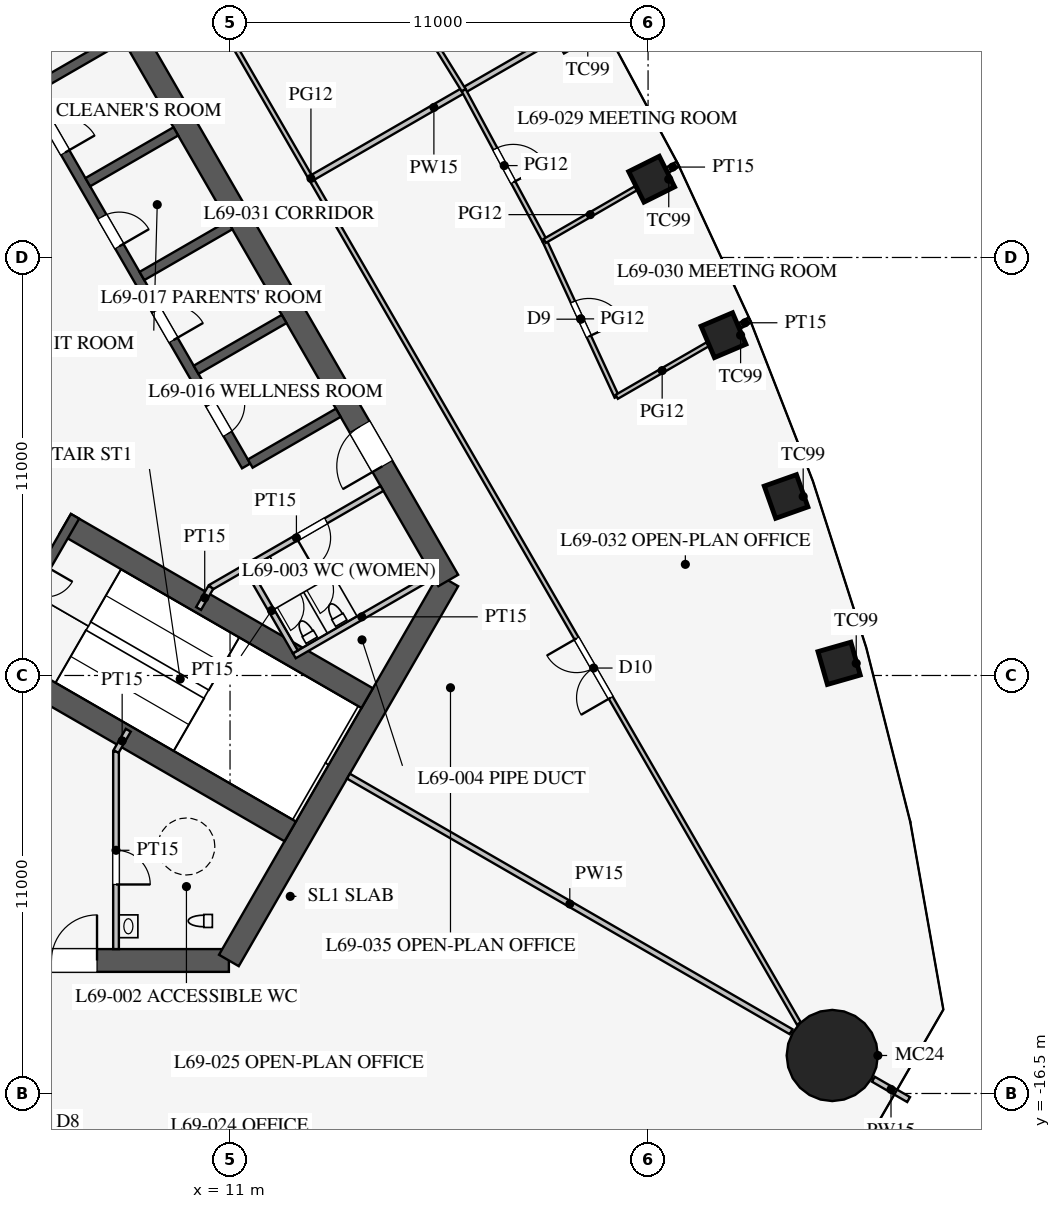
"""IFC4 building model, lengths in metres.
Left out: names, types, materials, properties, quantities, classifications, styles, units other than length and angle.
Written with IfcOpenShell. Run it as: python <this file> out.ifc"""

import sys

from ifc_helpers import new_model, si_unit, direction, frame, frame_2d, origin, origin_2d, place, context, subcontext, project, spatial, rectangle, circle, extrude, element, fill, save


model = new_model("IFC4")
c1 = context("Model", 3, precision=1e-05, world=origin(), true_north=direction((0.0, 1.0)))
c2 = subcontext(c1, "Body", "Model", "MODEL_VIEW")
j1 = project(units=[si_unit("LENGTHUNIT", "METRE"), si_unit("PLANEANGLEUNIT", "RADIAN")], contexts=[c1])
p1 = place(None, origin())
s1 = spatial("IfcSite", under=j1, at=p1, CompositionType="ELEMENT")
p2 = place(p1, origin())
s2 = spatial("IfcBuilding", under=s1, at=p2, CompositionType="ELEMENT")
p3 = place(p2, frame((0.0, 0.0, 301.5)))
s3 = spatial("IfcBuildingStorey", under=s2, at=p3, CompositionType="ELEMENT", Elevation=301.5)
for number, where, z_axis, x_axis in (
    (1, (27.027, -5.18, 0.0), (0.0, 0.0, 1.0), (-0.275, 0.961, 0.0)),
    (2, (25.632, -0.79, 0.0), (0.0, 0.0, 1.0), (-0.334, 0.942, 0.0)),
    (3, (23.985, 3.455, 0.0), (0.0, 0.0, 1.0), (-0.391, 0.92, 0.0)),
    (4, (22.094, 7.56, 0.0), (0.0, 0.0, 1.0), (-0.447, 0.895, 0.0)),
):
    element("IfcColumn", number, at=place(p3, frame(where, z_axis=z_axis, x_axis=x_axis)), inside=s3, PredefinedType="COLUMN", context=c2, shape_type="SweptSolid", body=[
        extrude(rectangle(XDim=0.9, YDim=0.9, at=origin_2d()), origin(), (0.0, 0.0, 1.0), 4.2),
    ])
p4 = place(p3, frame((26.847, -15.5, 0.0), z_axis=(0.0, 0.0, 1.0), x_axis=(1.0, 0.0, 0.0)))
e5 = element("IfcColumn", 5, at=p4, inside=s3, PredefinedType="COLUMN", context=c2, shape_type="SweptSolid", body=[
    extrude(circle(Radius=1.2, at=origin_2d()), origin(), (0.0, 0.0, 1.0), 4.2),
])
p5 = place(p3, frame((-10.97, -13.0, 0.0), z_axis=(0.0, 0.0, 1.0), x_axis=(1.0, 0.0, 0.0)))
e6 = element("IfcWall", 6, at=p5, inside=s3, PredefinedType="SHEAR", context=c2, shape_type="SweptSolid", body=[
    extrude(rectangle(XDim=21.939, YDim=0.6, at=frame_2d((10.97, 0.0))), origin(), (0.0, 0.0, 1.0), 4.2),
])
p6 = place(p5, frame((17.27, 0.0, 0.0)))
e7 = element("IfcOpeningElement", 7, at=p6, cuts=e6, PredefinedType="OPENING", context=c2, shape_type="SweptSolid", body=[
    extrude(rectangle(XDim=1.2, YDim=2.1, at=frame_2d((0.6, 1.05))), frame((0.0, 0.31, 0.0), z_axis=(0.0, -1.0, 0.0), x_axis=(1.0, 0.0, 0.0)), (0.0, 0.0, 1.0), 0.62),
])
p7 = place(p5, frame((3.47, 0.0, 0.0)))
e8 = element("IfcOpeningElement", 8, at=p7, cuts=e6, PredefinedType="OPENING", context=c2, shape_type="SweptSolid", body=[
    extrude(rectangle(XDim=1.2, YDim=2.1, at=frame_2d((0.6, 1.05))), frame((0.0, 0.31, 0.0), z_axis=(0.0, -1.0, 0.0), x_axis=(1.0, 0.0, 0.0)), (0.0, 0.0, 1.0), 0.62),
])
p8 = place(p3, frame((10.97, -13.0, 0.0), z_axis=(0.0, 0.0, 1.0), x_axis=(0.499995765644, 0.866027848477, 0.0)))
e9 = element("IfcWall", 9, at=p8, inside=s3, PredefinedType="SHEAR", context=c2, shape_type="SweptSolid", body=[
    extrude(rectangle(XDim=11.547, YDim=0.6, at=frame_2d((5.773, 0.0))), origin(), (0.0, 0.0, 1.0), 4.2),
])
p9 = place(p3, frame((16.743, -3.0, 0.0), z_axis=(0.0, 0.0, 1.0), x_axis=(-0.500002442456, 0.866023993627, 0.0)))
e10 = element("IfcWall", 10, at=p9, inside=s3, PredefinedType="SHEAR", context=c2, shape_type="SweptSolid", body=[
    extrude(rectangle(XDim=21.939, YDim=0.6, at=frame_2d((10.97, 0.0))), origin(), (0.0, 0.0, 1.0), 4.2),
])
p10 = place(p9, frame((17.27, 0.0, 0.0)))
e11 = element("IfcOpeningElement", 11, at=p10, cuts=e10, PredefinedType="OPENING", context=c2, shape_type="SweptSolid", body=[
    extrude(rectangle(XDim=1.2, YDim=2.1, at=frame_2d((0.6, 1.05))), frame((0.0, 0.31, 0.0), z_axis=(0.0, -1.0, 0.0), x_axis=(1.0, 0.0, 0.0)), (0.0, 0.0, 1.0), 0.62),
])
p11 = place(p9, frame((3.47, 0.0, 0.0)))
e12 = element("IfcOpeningElement", 12, at=p11, cuts=e10, PredefinedType="OPENING", context=c2, shape_type="SweptSolid", body=[
    extrude(rectangle(XDim=1.2, YDim=2.1, at=frame_2d((0.6, 1.05))), frame((0.0, 0.31, 0.0), z_axis=(0.0, -1.0, 0.0), x_axis=(1.0, 0.0, 0.0)), (0.0, 0.0, 1.0), 0.62),
])
p12 = place(p3, frame((11.424, 0.014, 0.0), z_axis=(0.0, 0.0, 1.0), x_axis=(-0.500001763848, 0.866024385424, 0.0)))
e13 = element("IfcWall", 13, at=p12, inside=s3, PredefinedType="SHEAR", context=c2, shape_type="SweptSolid", body=[
    extrude(rectangle(XDim=11.4, YDim=0.25, at=frame_2d((5.7, 0.0))), origin(), (0.0, 0.0, 1.0), 4.2),
])
p13 = place(p12, frame((0.975, 0.0, 0.0)))
e14 = element("IfcOpeningElement", 14, at=p13, cuts=e13, PredefinedType="OPENING", context=c2, shape_type="SweptSolid", body=[
    extrude(rectangle(XDim=0.9, YDim=2.1, at=frame_2d((0.45, 1.05))), frame((0.0, 0.135, 0.0), z_axis=(0.0, -1.0, 0.0), x_axis=(1.0, 0.0, 0.0)), (0.0, 0.0, 1.0), 0.27),
])
p14 = place(p12, frame((3.825, 0.0, 0.0)))
e15 = element("IfcOpeningElement", 15, at=p14, cuts=e13, PredefinedType="OPENING", context=c2, shape_type="SweptSolid", body=[
    extrude(rectangle(XDim=0.9, YDim=2.1, at=frame_2d((0.45, 1.05))), frame((0.0, 0.135, 0.0), z_axis=(0.0, -1.0, 0.0), x_axis=(1.0, 0.0, 0.0)), (0.0, 0.0, 1.0), 0.27),
])
p15 = place(p12, frame((6.675, 0.0, 0.0)))
e16 = element("IfcOpeningElement", 16, at=p15, cuts=e13, PredefinedType="OPENING", context=c2, shape_type="SweptSolid", body=[
    extrude(rectangle(XDim=0.9, YDim=2.1, at=frame_2d((0.45, 1.05))), frame((0.0, 0.135, 0.0), z_axis=(0.0, -1.0, 0.0), x_axis=(1.0, 0.0, 0.0)), (0.0, 0.0, 1.0), 0.27),
])
p16 = place(p12, frame((9.525, 0.0, 0.0)))
e17 = element("IfcOpeningElement", 17, at=p16, cuts=e13, PredefinedType="OPENING", context=c2, shape_type="SweptSolid", body=[
    extrude(rectangle(XDim=0.9, YDim=2.1, at=frame_2d((0.45, 1.05))), frame((0.0, 0.135, 0.0), z_axis=(0.0, -1.0, 0.0), x_axis=(1.0, 0.0, 0.0)), (0.0, 0.0, 1.0), 0.27),
])
for number, where, z_axis, x_axis in (
    (18, (11.532, 0.076, 0.0), (0.0, 0.0, 1.0), (0.866, 0.5, 0.0)),
    (19, (10.107, 2.544, 0.0), (0.0, 0.0, 1.0), (0.866, 0.5, 0.0)),
    (20, (8.682, 5.012, 0.0), (0.0, 0.0, 1.0), (0.866, 0.5, 0.0)),
    (21, (7.257, 7.481, 0.0), (0.0, 0.0, 1.0), (0.866, 0.5, 0.0)),
    (22, (5.832, 9.949, 0.0), (0.0, 0.0, 1.0), (0.866, 0.5, 0.0)),
):
    element("IfcWall", number, at=place(p3, frame(where, z_axis=z_axis, x_axis=x_axis)), inside=s3, PredefinedType="SHEAR", context=c2, shape_type="SweptSolid", body=[
        extrude(rectangle(XDim=2.675, YDim=0.25, at=frame_2d((1.337, 0.0))), origin(), (0.0, 0.0, 1.0), 4.2),
    ])
p17 = place(p3, frame((4.638, -5.016, 0.0), z_axis=(0.0, 0.0, 1.0), x_axis=(0.866012320003, -0.50002266109, 0.0)))
e23 = element("IfcWall", 23, at=p17, inside=s3, PredefinedType="SHEAR", context=c2, shape_type="SweptSolid", body=[
    extrude(rectangle(XDim=9.175, YDim=0.6, at=frame_2d((4.587, 0.0))), origin(), (0.0, 0.0, 1.0), 4.2),
])
p18 = place(p3, frame((6.663, -1.509, 0.0), z_axis=(0.0, 0.0, 1.0), x_axis=(0.86603049496, -0.499991181721, 0.0)))
e24 = element("IfcWall", 24, at=p18, inside=s3, PredefinedType="SHEAR", context=c2, shape_type="SweptSolid", body=[
    extrude(rectangle(XDim=9.175, YDim=0.6, at=frame_2d((4.587, 0.0))), origin(), (0.0, 0.0, 1.0), 4.2),
])
p19 = place(p3, frame((4.597, -5.339, 0.0), z_axis=(0.0, 0.0, 1.0), x_axis=(0.499984536904, 0.866034331223, 0.0)))
e25 = element("IfcWall", 25, at=p19, inside=s3, PredefinedType="SHEAR", context=c2, shape_type="SweptSolid", body=[
    extrude(rectangle(XDim=4.65, YDim=0.25, at=frame_2d((2.325, 0.0))), origin(), (0.0, 0.0, 1.0), 4.2),
])
p20 = place(p19, frame((1.525, 0.0, 0.0)))
e26 = element("IfcOpeningElement", 26, at=p20, cuts=e25, PredefinedType="OPENING", context=c2, shape_type="SweptSolid", body=[
    extrude(rectangle(XDim=1.6, YDim=2.1, at=frame_2d((0.8, 1.05))), frame((0.0, 0.135, 0.0), z_axis=(0.0, -1.0, 0.0), x_axis=(1.0, 0.0, 0.0)), (0.0, 0.0, 1.0), 0.27),
])
p21 = place(p3, frame((8.0, -7.5, 0.0), z_axis=(0.0, 0.0, 1.0), x_axis=(0.0, -1.0, 0.0)))
e27 = element("IfcWall", 27, at=p21, inside=s3, PredefinedType="PARTITIONING", context=c2, shape_type="SweptSolid", body=[
    extrude(rectangle(XDim=5.2, YDim=0.15, at=frame_2d((2.6, 0.0))), origin(), (0.0, 0.0, 1.0), 4.0),
])
p22 = place(p21, frame((2.6, 0.0, 0.0)))
e28 = element("IfcOpeningElement", 28, at=p22, cuts=e27, PredefinedType="OPENING", context=c2, shape_type="SweptSolid", body=[
    extrude(rectangle(XDim=0.9, YDim=2.1, at=frame_2d((0.45, 1.05))), frame((0.0, 0.085, 0.0), z_axis=(0.0, -1.0, 0.0), x_axis=(1.0, 0.0, 0.0)), (0.0, 0.0, 1.0), 0.17),
])
p23 = place(p3, frame((2.495, 10.678, 0.0), z_axis=(0.0, 0.0, 1.0), x_axis=(0.866021400173, 0.500006934395, 0.0)))
e29 = element("IfcWall", 29, at=p23, inside=s3, PredefinedType="PARTITIONING", context=c2, shape_type="SweptSolid", body=[
    extrude(rectangle(XDim=5.2, YDim=0.15, at=frame_2d((2.6, 0.0))), origin(), (0.0, 0.0, 1.0), 4.0),
])
p24 = place(p23, frame((1.3, 0.0, 0.0)))
e30 = element("IfcOpeningElement", 30, at=p24, cuts=e29, PredefinedType="OPENING", context=c2, shape_type="SweptSolid", body=[
    extrude(rectangle(XDim=0.9, YDim=2.1, at=frame_2d((0.45, 1.05))), frame((0.0, 0.085, 0.0), z_axis=(0.0, -1.0, 0.0), x_axis=(1.0, 0.0, 0.0)), (0.0, 0.0, 1.0), 0.17),
])
p25 = place(p3, frame((10.495, -3.178, 0.0), z_axis=(0.0, 0.0, 1.0), x_axis=(0.866021400173, 0.500006934395, 0.0)))
e31 = element("IfcWall", 31, at=p25, inside=s3, PredefinedType="PARTITIONING", context=c2, shape_type="SweptSolid", body=[
    extrude(rectangle(XDim=5.2, YDim=0.15, at=frame_2d((2.6, 0.0))), origin(), (0.0, 0.0, 1.0), 4.0),
])
p26 = place(p25, frame((2.6, 0.0, 0.0)))
e32 = element("IfcOpeningElement", 32, at=p26, cuts=e31, PredefinedType="OPENING", context=c2, shape_type="SweptSolid", body=[
    extrude(rectangle(XDim=0.9, YDim=2.1, at=frame_2d((0.45, 1.05))), frame((0.0, 0.085, 0.0), z_axis=(0.0, -1.0, 0.0), x_axis=(1.0, 0.0, 0.0)), (0.0, 0.0, 1.0), 0.17),
])
for number, where, z_axis, x_axis in (
    (33, (8.0, -7.5, 0.0), (0.0, 0.0, 1.0), (0.5, 0.866, 0.0)),
    (34, (10.495, -3.178, 0.0), (0.0, 0.0, 1.0), (-0.5, -0.866, 0.0)),
):
    element("IfcWall", number, at=place(p3, frame(where, z_axis=z_axis, x_axis=x_axis)), inside=s3, PredefinedType="PARTITIONING", context=c2, shape_type="SweptSolid", body=[
        extrude(rectangle(XDim=0.645, YDim=0.15, at=frame_2d((0.323, 0.0))), origin(), (0.0, 0.0, 1.0), 4.0),
    ])
p27 = place(p3, frame((12.691, -4.982, 0.0), z_axis=(0.0, 0.0, 1.0), x_axis=(0.8660249478, 0.500000789788, 0.0)))
e35 = element("IfcWall", 35, at=p27, inside=s3, PredefinedType="PARTITIONING", context=c2, shape_type="SweptSolid", body=[
    extrude(rectangle(XDim=4.1, YDim=0.15, at=frame_2d((2.05, 0.0))), origin(), (0.0, 0.0, 1.0), 4.0),
])
p28 = place(p3, frame((11.464, -2.706, 0.0), z_axis=(0.0, 0.0, 1.0), x_axis=(0.50001992892, -0.866013897511, 0.0)))
e36 = element("IfcWall", 36, at=p28, inside=s3, PredefinedType="PARTITIONING", context=c2, shape_type="SweptSolid", body=[
    extrude(rectangle(XDim=2.51, YDim=0.15, at=frame_2d((1.255, 0.0))), origin(), (0.0, 0.0, 1.0), 4.0),
])
p29 = place(p3, frame((14.116, -8.15, 0.0), z_axis=(0.0, 0.0, 1.0), x_axis=(0.866020541135, -0.500008422262, 0.0)))
e37 = element("IfcWall", 37, at=p29, inside=s3, PredefinedType="PARTITIONING", context=c2, shape_type="SweptSolid", body=[
    extrude(rectangle(XDim=13.45, YDim=0.15, at=frame_2d((6.725, 0.0))), origin(), (0.0, 0.0, 1.0), 2.5),
])
p30 = place(p3, frame((27.929, -16.125, 0.0), z_axis=(0.0, 0.0, 1.0), x_axis=(0.866086810508, -0.499893625349, 0.0)))
e38 = element("IfcWall", 38, at=p30, inside=s3, PredefinedType="PARTITIONING", context=c2, shape_type="SweptSolid", body=[
    extrude(rectangle(XDim=1.07, YDim=0.15, at=frame_2d((0.535, 0.0))), origin(), (0.0, 0.0, 1.0), 2.5),
])
p31 = place(p3, frame((13.181, 7.61, 0.0), z_axis=(0.0, 0.0, 1.0), x_axis=(0.866027421574, 0.49999650507, 0.0)))
e39 = element("IfcWall", 39, at=p31, inside=s3, PredefinedType="PARTITIONING", context=c2, shape_type="SweptSolid", body=[
    extrude(rectangle(XDim=7.352, YDim=0.15, at=frame_2d((3.676, 0.0))), origin(), (0.0, 0.0, 1.0), 3.3),
])
p32 = place(p3, frame((25.968, -14.657, 0.0), z_axis=(0.0, 0.0, 1.0), x_axis=(-0.500000361757, 0.866025194924, 0.0)))
e40 = element("IfcWall", 40, at=p32, inside=s3, PredefinedType="PARTITIONING", context=c2, shape_type="SweptSolid", body=[
    extrude(rectangle(XDim=51.355, YDim=0.12, at=frame_2d((25.678, 0.0))), origin(), (0.0, 0.0, 1.0), 2.9),
])
p33 = place(p32, frame((9.9, 0.0, 0.15)))
e41 = element("IfcOpeningElement", 41, at=p33, cuts=e40, PredefinedType="OPENING", context=c2, shape_type="SweptSolid", body=[
    extrude(rectangle(XDim=1.8, YDim=2.1, at=frame_2d((0.9, 1.05))), frame((0.0, 0.07, 0.0), z_axis=(0.0, -1.0, 0.0), x_axis=(1.0, 0.0, 0.0)), (0.0, 0.0, 1.0), 0.14),
])
p34 = place(p32, frame((39.65, 0.0, 0.15)))
e42 = element("IfcOpeningElement", 42, at=p34, cuts=e40, PredefinedType="OPENING", context=c2, shape_type="SweptSolid", body=[
    extrude(rectangle(XDim=1.8, YDim=2.1, at=frame_2d((0.9, 1.05))), frame((0.0, 0.07, 0.0), z_axis=(0.0, -1.0, 0.0), x_axis=(1.0, 0.0, 0.0)), (0.0, 0.0, 1.0), 0.14),
])
p35 = place(p3, frame((22.51, 7.8, 0.0), z_axis=(0.0, 0.0, 1.0), x_axis=(0.866095534226, 0.499878510834, 0.0)))
e43 = element("IfcWall", 43, at=p35, inside=s3, PredefinedType="PARTITIONING", context=c2, shape_type="SweptSolid", body=[
    extrude(rectangle(XDim=0.316, YDim=0.15, at=frame_2d((0.158, 0.0))), origin(), (0.0, 0.0, 1.0), 2.9),
])
p36 = place(p3, frame((24.422, 3.708, 0.0), z_axis=(0.0, 0.0, 1.0), x_axis=(0.866254317358, 0.499603300288, 0.0)))
e44 = element("IfcWall", 44, at=p36, inside=s3, PredefinedType="PARTITIONING", context=c2, shape_type="SweptSolid", body=[
    extrude(rectangle(XDim=0.296, YDim=0.15, at=frame_2d((0.148, 0.0))), origin(), (0.0, 0.0, 1.0), 2.9),
])
p37 = place(p3, frame((17.149, 9.901, 0.0), z_axis=(0.0, 0.0, 1.0), x_axis=(-0.525981173851, 0.850496210899, 0.0)))
e45 = element("IfcWall", 45, at=p37, inside=s3, PredefinedType="PARTITIONING", context=c2, shape_type="SweptSolid", body=[
    extrude(rectangle(XDim=4.502, YDim=0.12, at=frame_2d((2.251, 0.0))), origin(), (0.0, 0.0, 1.0), 2.9),
])
p38 = place(p37, frame((1.8, 0.0, 0.15)))
e46 = element("IfcOpeningElement", 46, at=p38, cuts=e45, PredefinedType="OPENING", context=c2, shape_type="SweptSolid", body=[
    extrude(rectangle(XDim=0.9, YDim=2.1, at=frame_2d((0.45, 1.05))), frame((0.0, 0.07, 0.0), z_axis=(0.0, -1.0, 0.0), x_axis=(1.0, 0.0, 0.0)), (0.0, 0.0, 1.0), 0.14),
])
p39 = place(p3, frame((19.281, 5.936, 0.0), z_axis=(0.0, 0.0, 1.0), x_axis=(-0.473566170147, 0.880758242932, 0.0)))
e47 = element("IfcWall", 47, at=p39, inside=s3, PredefinedType="PARTITIONING", context=c2, shape_type="SweptSolid", body=[
    extrude(rectangle(XDim=4.502, YDim=0.12, at=frame_2d((2.251, 0.0))), origin(), (0.0, 0.0, 1.0), 2.9),
])
p40 = place(p39, frame((1.75, 0.0, 0.15)))
e48 = element("IfcOpeningElement", 48, at=p40, cuts=e47, PredefinedType="OPENING", context=c2, shape_type="SweptSolid", body=[
    extrude(rectangle(XDim=1.0, YDim=2.1, at=frame_2d((0.5, 1.05))), frame((0.0, 0.07, 0.0), z_axis=(0.0, -1.0, 0.0), x_axis=(1.0, 0.0, 0.0)), (0.0, 0.0, 1.0), 0.14),
])
p41 = place(p3, frame((21.175, 1.833, 0.0), z_axis=(0.0, 0.0, 1.0), x_axis=(-0.419270595022, 0.907861315483, 0.0)))
e49 = element("IfcWall", 49, at=p41, inside=s3, PredefinedType="PARTITIONING", context=c2, shape_type="SweptSolid", body=[
    extrude(rectangle(XDim=4.519, YDim=0.12, at=frame_2d((2.259, 0.0))), origin(), (0.0, 0.0, 1.0), 2.9),
])
p42 = place(p41, frame((1.75, 0.0, 0.15)))
e50 = element("IfcOpeningElement", 50, at=p42, cuts=e49, PredefinedType="OPENING", context=c2, shape_type="SweptSolid", body=[
    extrude(rectangle(XDim=1.0, YDim=2.1, at=frame_2d((0.5, 1.05))), frame((0.0, 0.07, 0.0), z_axis=(0.0, -1.0, 0.0), x_axis=(1.0, 0.0, 0.0)), (0.0, 0.0, 1.0), 0.14),
])
p43 = place(p3, frame((19.281, 5.936, 0.0), z_axis=(0.0, 0.0, 1.0), x_axis=(0.866019581949, 0.500010083578, 0.0)))
e51 = element("IfcWall", 51, at=p43, inside=s3, PredefinedType="PARTITIONING", context=c2, shape_type="SweptSolid", body=[
    extrude(rectangle(XDim=2.768, YDim=0.12, at=frame_2d((1.384, 0.0))), origin(), (0.0, 0.0, 1.0), 2.9),
])
p44 = place(p3, frame((21.175, 1.833, 0.0), z_axis=(0.0, 0.0, 1.0), x_axis=(0.86602506628, 0.500000584575, 0.0)))
e52 = element("IfcWall", 52, at=p44, inside=s3, PredefinedType="PARTITIONING", context=c2, shape_type="SweptSolid", body=[
    extrude(rectangle(XDim=2.761, YDim=0.12, at=frame_2d((1.38, 0.0))), origin(), (0.0, 0.0, 1.0), 2.9),
])
p45 = place(p22, origin())
e53 = element("IfcDoor", 53, at=p45, inside=s3, OperationType="SINGLE_SWING_RIGHT", PredefinedType="DOOR", context=c2, shape_type="SweptSolid", body=[
    extrude(rectangle(XDim=0.9, YDim=2.1, at=frame_2d((0.45, 1.05))), frame((0.0, 0.025, 0.0), z_axis=(0.0, -1.0, 0.0), x_axis=(1.0, 0.0, 0.0)), (0.0, 0.0, 1.0), 0.05),
])
fill(e28, e53)
p46 = place(p26, frame((0.9, 0.0, 0.0), z_axis=(0.0, 0.0, 1.0), x_axis=(-1.0, 0.0, 0.0)))
e54 = element("IfcDoor", 54, at=p46, inside=s3, OperationType="SINGLE_SWING_RIGHT", PredefinedType="DOOR", context=c2, shape_type="SweptSolid", body=[
    extrude(rectangle(XDim=0.9, YDim=2.1, at=frame_2d((0.45, 1.05))), frame((0.0, 0.025, 0.0), z_axis=(0.0, -1.0, 0.0), x_axis=(1.0, 0.0, 0.0)), (0.0, 0.0, 1.0), 0.05),
])
fill(e32, e54)
p47 = place(p6, origin())
e55 = element("IfcDoor", 55, at=p47, inside=s3, OperationType="SINGLE_SWING_RIGHT", PredefinedType="DOOR", context=c2, shape_type="SweptSolid", body=[
    extrude(rectangle(XDim=1.2, YDim=2.1, at=frame_2d((0.6, 1.05))), frame((0.0, 0.025, 0.0), z_axis=(0.0, -1.0, 0.0), x_axis=(1.0, 0.0, 0.0)), (0.0, 0.0, 1.0), 0.05),
])
fill(e7, e55)
p48 = place(p11, origin())
e56 = element("IfcDoor", 56, at=p48, inside=s3, OperationType="SINGLE_SWING_LEFT", PredefinedType="DOOR", context=c2, shape_type="SweptSolid", body=[
    extrude(rectangle(XDim=1.2, YDim=2.1, at=frame_2d((0.6, 1.05))), frame((0.0, 0.025, 0.0), z_axis=(0.0, -1.0, 0.0), x_axis=(1.0, 0.0, 0.0)), (0.0, 0.0, 1.0), 0.05),
])
fill(e12, e56)
p49 = place(p13, frame((0.9, 0.0, 0.0), z_axis=(0.0, 0.0, 1.0), x_axis=(-1.0, 0.0, 0.0)))
e57 = element("IfcDoor", 57, at=p49, inside=s3, OperationType="SINGLE_SWING_LEFT", PredefinedType="DOOR", context=c2, shape_type="SweptSolid", body=[
    extrude(rectangle(XDim=0.9, YDim=2.1, at=frame_2d((0.45, 1.05))), frame((0.0, 0.025, 0.0), z_axis=(0.0, -1.0, 0.0), x_axis=(1.0, 0.0, 0.0)), (0.0, 0.0, 1.0), 0.05),
])
fill(e14, e57)
p50 = place(p14, frame((0.9, 0.0, 0.0), z_axis=(0.0, 0.0, 1.0), x_axis=(-1.0, 0.0, 0.0)))
e58 = element("IfcDoor", 58, at=p50, inside=s3, OperationType="SINGLE_SWING_RIGHT", PredefinedType="DOOR", context=c2, shape_type="SweptSolid", body=[
    extrude(rectangle(XDim=0.9, YDim=2.1, at=frame_2d((0.45, 1.05))), frame((0.0, 0.025, 0.0), z_axis=(0.0, -1.0, 0.0), x_axis=(1.0, 0.0, 0.0)), (0.0, 0.0, 1.0), 0.05),
])
fill(e15, e58)
p51 = place(p15, frame((0.9, 0.0, 0.0), z_axis=(0.0, 0.0, 1.0), x_axis=(-1.0, 0.0, 0.0)))
e59 = element("IfcDoor", 59, at=p51, inside=s3, OperationType="SINGLE_SWING_RIGHT", PredefinedType="DOOR", context=c2, shape_type="SweptSolid", body=[
    extrude(rectangle(XDim=0.9, YDim=2.1, at=frame_2d((0.45, 1.05))), frame((0.0, 0.025, 0.0), z_axis=(0.0, -1.0, 0.0), x_axis=(1.0, 0.0, 0.0)), (0.0, 0.0, 1.0), 0.05),
])
fill(e16, e59)
p52 = place(p16, frame((0.9, 0.0, 0.0), z_axis=(0.0, 0.0, 1.0), x_axis=(-1.0, 0.0, 0.0)))
e60 = element("IfcDoor", 60, at=p52, inside=s3, OperationType="SINGLE_SWING_RIGHT", PredefinedType="DOOR", context=c2, shape_type="SweptSolid", body=[
    extrude(rectangle(XDim=0.9, YDim=2.1, at=frame_2d((0.45, 1.05))), frame((0.0, 0.025, 0.0), z_axis=(0.0, -1.0, 0.0), x_axis=(1.0, 0.0, 0.0)), (0.0, 0.0, 1.0), 0.05),
])
fill(e17, e60)
p53 = place(p40, frame((1.0, 0.0, 0.0), z_axis=(0.0, 0.0, 1.0), x_axis=(-1.0, 0.0, 0.0)))
e61 = element("IfcDoor", 61, at=p53, inside=s3, OperationType="SINGLE_SWING_RIGHT", PredefinedType="DOOR", context=c2, shape_type="SweptSolid", body=[
    extrude(rectangle(XDim=1.0, YDim=2.1, at=frame_2d((0.5, 1.05))), frame((0.0, 0.025, 0.0), z_axis=(0.0, -1.0, 0.0), x_axis=(1.0, 0.0, 0.0)), (0.0, 0.0, 1.0), 0.05),
])
fill(e48, e61)
p54 = place(p42, frame((1.0, 0.0, 0.0), z_axis=(0.0, 0.0, 1.0), x_axis=(-1.0, 0.0, 0.0)))
e62 = element("IfcDoor", 62, at=p54, inside=s3, OperationType="SINGLE_SWING_RIGHT", PredefinedType="DOOR", context=c2, shape_type="SweptSolid", body=[
    extrude(rectangle(XDim=1.0, YDim=2.1, at=frame_2d((0.5, 1.05))), frame((0.0, 0.025, 0.0), z_axis=(0.0, -1.0, 0.0), x_axis=(1.0, 0.0, 0.0)), (0.0, 0.0, 1.0), 0.05),
])
fill(e50, e62)
p55 = place(p33, origin())
e63 = element("IfcDoor", 63, at=p55, inside=s3, OperationType="DOUBLE_DOOR_SINGLE_SWING", PredefinedType="DOOR", context=c2, shape_type="SweptSolid", body=[
    extrude(rectangle(XDim=1.8, YDim=2.1, at=frame_2d((0.9, 1.05))), frame((0.0, 0.025, 0.0), z_axis=(0.0, -1.0, 0.0), x_axis=(1.0, 0.0, 0.0)), (0.0, 0.0, 1.0), 0.05),
])
fill(e41, e63)
save(model, sys.argv[1])
